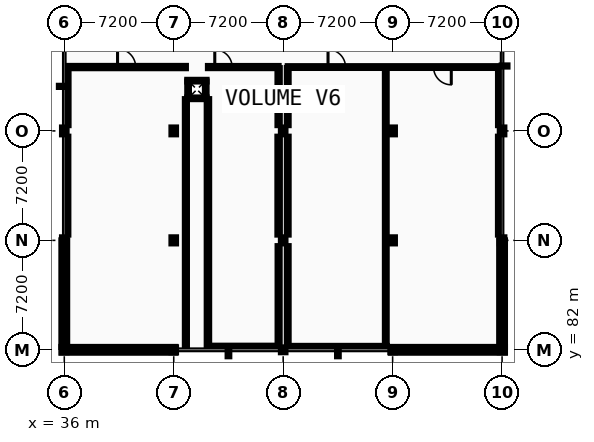
"""IFC4 building model, lengths in metres.
Left out: names, types, materials, properties, quantities, classifications, styles, units other than length and angle.
Written with IfcOpenShell. Run it as: python <this file> out.ifc"""

import sys

from ifc_helpers import new_model, si_unit, direction, frame, frame_2d, origin, origin_2d, place, context, subcontext, project, spatial, rectangle, i_section, extrude, element, fill, save


model = new_model("IFC4")
c1 = context("Model", 3, precision=1e-05, world=origin(), true_north=direction((0.0, 1.0)))
c2 = subcontext(c1, "Body", "Model", "MODEL_VIEW")
j1 = project(units=[si_unit("LENGTHUNIT", "METRE"), si_unit("PLANEANGLEUNIT", "RADIAN")], contexts=[c1])
p1 = place(None, origin())
s1 = spatial("IfcSite", under=j1, at=p1, CompositionType="ELEMENT")
p2 = place(p1, origin())
s2 = spatial("IfcBuilding", under=s1, at=p2, CompositionType="ELEMENT")
p3 = place(p2, frame((0.0, 0.0, 5.2)))
s3 = spatial("IfcBuildingStorey", under=s2, at=p3, CompositionType="ELEMENT", Elevation=5.2)
p4 = place(p3, frame((36.0, 82.0, 0.0), z_axis=(0.0, 0.0, 1.0), x_axis=(1.0, 0.0, 0.0)))
e1 = element("IfcColumn", 1, at=p4, inside=s3, PredefinedType="COLUMN", context=c2, shape_type="SweptSolid", body=[
    extrude(i_section(OverallWidth=0.3, OverallDepth=0.32, WebThickness=0.011, FlangeThickness=0.021, FilletRadius=0.027, at=origin_2d()), origin(), (0.0, 0.0, 1.0), 4.4),
])
p5 = place(p3, frame((36.0, 89.2, 0.0), z_axis=(0.0, 0.0, 1.0), x_axis=(1.0, 0.0, 0.0)))
e2 = element("IfcColumn", 2, at=p5, inside=s3, PredefinedType="COLUMN", context=c2, shape_type="SweptSolid", body=[
    extrude(i_section(OverallWidth=0.3, OverallDepth=0.4, WebThickness=0.013, FlangeThickness=0.024, FilletRadius=0.027, at=origin_2d()), origin(), (0.0, 0.0, 1.0), 4.4),
])
p6 = place(p3, frame((36.0, 96.4, 0.0), z_axis=(0.0, 0.0, 1.0), x_axis=(1.0, 0.0, 0.0)))
e3 = element("IfcColumn", 3, at=p6, inside=s3, PredefinedType="COLUMN", context=c2, shape_type="SweptSolid", body=[
    extrude(i_section(OverallWidth=0.3, OverallDepth=0.45, WebThickness=0.014, FlangeThickness=0.026, FilletRadius=0.027, at=origin_2d()), origin(), (0.0, 0.0, 1.0), 4.4),
])
p7 = place(p3, frame((43.2, 82.0, 0.0), z_axis=(0.0, 0.0, 1.0), x_axis=(1.0, 0.0, 0.0)))
e4 = element("IfcColumn", 4, at=p7, inside=s3, PredefinedType="COLUMN", context=c2, shape_type="SweptSolid", body=[
    extrude(i_section(OverallWidth=0.3, OverallDepth=0.32, WebThickness=0.011, FlangeThickness=0.021, FilletRadius=0.027, at=origin_2d()), origin(), (0.0, 0.0, 1.0), 4.4),
])
p8 = place(p3, frame((43.2, 89.2, 0.0), z_axis=(0.0, 0.0, 1.0), x_axis=(1.0, 0.0, 0.0)))
e5 = element("IfcColumn", 5, at=p8, inside=s3, PredefinedType="COLUMN", context=c2, shape_type="SweptSolid", body=[
    extrude(i_section(OverallWidth=0.3, OverallDepth=0.4, WebThickness=0.013, FlangeThickness=0.024, FilletRadius=0.027, at=origin_2d()), origin(), (0.0, 0.0, 1.0), 4.4),
])
p9 = place(p3, frame((43.2, 96.4, 0.0), z_axis=(0.0, 0.0, 1.0), x_axis=(1.0, 0.0, 0.0)))
e6 = element("IfcColumn", 6, at=p9, inside=s3, PredefinedType="COLUMN", context=c2, shape_type="SweptSolid", body=[
    extrude(i_section(OverallWidth=0.3, OverallDepth=0.45, WebThickness=0.014, FlangeThickness=0.026, FilletRadius=0.027, at=origin_2d()), origin(), (0.0, 0.0, 1.0), 4.4),
])
p10 = place(p3, frame((50.4, 82.0, 0.0), z_axis=(0.0, 0.0, 1.0), x_axis=(1.0, 0.0, 0.0)))
e7 = element("IfcColumn", 7, at=p10, inside=s3, PredefinedType="COLUMN", context=c2, shape_type="SweptSolid", body=[
    extrude(i_section(OverallWidth=0.3, OverallDepth=0.32, WebThickness=0.011, FlangeThickness=0.021, FilletRadius=0.027, at=origin_2d()), origin(), (0.0, 0.0, 1.0), 4.4),
])
p11 = place(p3, frame((50.4, 89.2, 0.0), z_axis=(0.0, 0.0, 1.0), x_axis=(1.0, 0.0, 0.0)))
e8 = element("IfcColumn", 8, at=p11, inside=s3, PredefinedType="COLUMN", context=c2, shape_type="SweptSolid", body=[
    extrude(i_section(OverallWidth=0.3, OverallDepth=0.4, WebThickness=0.013, FlangeThickness=0.024, FilletRadius=0.027, at=origin_2d()), origin(), (0.0, 0.0, 1.0), 4.4),
])
p12 = place(p3, frame((50.4, 96.4, 0.0), z_axis=(0.0, 0.0, 1.0), x_axis=(1.0, 0.0, 0.0)))
e9 = element("IfcColumn", 9, at=p12, inside=s3, PredefinedType="COLUMN", context=c2, shape_type="SweptSolid", body=[
    extrude(i_section(OverallWidth=0.3, OverallDepth=0.45, WebThickness=0.014, FlangeThickness=0.026, FilletRadius=0.027, at=origin_2d()), origin(), (0.0, 0.0, 1.0), 4.4),
])
p13 = place(p3, frame((57.6, 82.0, 0.0), z_axis=(0.0, 0.0, 1.0), x_axis=(1.0, 0.0, 0.0)))
e10 = element("IfcColumn", 10, at=p13, inside=s3, PredefinedType="COLUMN", context=c2, shape_type="SweptSolid", body=[
    extrude(i_section(OverallWidth=0.3, OverallDepth=0.32, WebThickness=0.011, FlangeThickness=0.021, FilletRadius=0.027, at=origin_2d()), origin(), (0.0, 0.0, 1.0), 4.4),
])
p14 = place(p3, frame((57.6, 89.2, 0.0), z_axis=(0.0, 0.0, 1.0), x_axis=(1.0, 0.0, 0.0)))
e11 = element("IfcColumn", 11, at=p14, inside=s3, PredefinedType="COLUMN", context=c2, shape_type="SweptSolid", body=[
    extrude(i_section(OverallWidth=0.3, OverallDepth=0.4, WebThickness=0.013, FlangeThickness=0.024, FilletRadius=0.027, at=origin_2d()), origin(), (0.0, 0.0, 1.0), 4.4),
])
p15 = place(p3, frame((57.6, 96.4, 0.0), z_axis=(0.0, 0.0, 1.0), x_axis=(1.0, 0.0, 0.0)))
e12 = element("IfcColumn", 12, at=p15, inside=s3, PredefinedType="COLUMN", context=c2, shape_type="SweptSolid", body=[
    extrude(i_section(OverallWidth=0.3, OverallDepth=0.45, WebThickness=0.014, FlangeThickness=0.026, FilletRadius=0.027, at=origin_2d()), origin(), (0.0, 0.0, 1.0), 4.4),
])
p16 = place(p3, frame((64.8, 82.0, 0.0), z_axis=(0.0, 0.0, 1.0), x_axis=(1.0, 0.0, 0.0)))
e13 = element("IfcColumn", 13, at=p16, inside=s3, PredefinedType="COLUMN", context=c2, shape_type="SweptSolid", body=[
    extrude(i_section(OverallWidth=0.3, OverallDepth=0.32, WebThickness=0.011, FlangeThickness=0.021, FilletRadius=0.027, at=origin_2d()), origin(), (0.0, 0.0, 1.0), 4.4),
])
p17 = place(p3, frame((64.8, 89.2, 0.0), z_axis=(0.0, 0.0, 1.0), x_axis=(1.0, 0.0, 0.0)))
e14 = element("IfcColumn", 14, at=p17, inside=s3, PredefinedType="COLUMN", context=c2, shape_type="SweptSolid", body=[
    extrude(i_section(OverallWidth=0.3, OverallDepth=0.4, WebThickness=0.013, FlangeThickness=0.024, FilletRadius=0.027, at=origin_2d()), origin(), (0.0, 0.0, 1.0), 4.4),
])
p18 = place(p3, frame((64.8, 96.4, 0.0), z_axis=(0.0, 0.0, 1.0), x_axis=(1.0, 0.0, 0.0)))
e15 = element("IfcColumn", 15, at=p18, inside=s3, PredefinedType="COLUMN", context=c2, shape_type="SweptSolid", body=[
    extrude(i_section(OverallWidth=0.3, OverallDepth=0.45, WebThickness=0.014, FlangeThickness=0.026, FilletRadius=0.027, at=origin_2d()), origin(), (0.0, 0.0, 1.0), 4.4),
])
p19 = place(p3, frame((35.81, 82.0, 0.0), z_axis=(0.0, 0.0, 1.0), x_axis=(1.0, 0.0, 0.0)))
e16 = element("IfcWall", 16, at=p19, inside=s3, PredefinedType="STANDARD", context=c2, shape_type="SweptSolid", body=[
    extrude(rectangle(XDim=7.5, YDim=0.38, at=frame_2d((3.75, 0.0))), origin(), (0.0, 0.0, 1.0), 3.88),
])
p20 = place(p19, frame((1.718, 0.0, 0.95)))
e17 = element("IfcOpeningElement", 17, at=p20, cuts=e16, PredefinedType="OPENING", context=c2, shape_type="SweptSolid", body=[
    extrude(rectangle(XDim=1.064, YDim=1.368, at=frame_2d((0.532, 0.684))), frame((0.0, 0.2, 0.0), z_axis=(0.0, -1.0, 0.0), x_axis=(1.0, 0.0, 0.0)), (0.0, 0.0, 1.0), 0.4),
])
p21 = place(p19, frame((4.718, 0.0, 0.95)))
e18 = element("IfcOpeningElement", 18, at=p21, cuts=e16, PredefinedType="OPENING", context=c2, shape_type="SweptSolid", body=[
    extrude(rectangle(XDim=1.064, YDim=1.368, at=frame_2d((0.532, 0.684))), frame((0.0, 0.2, 0.0), z_axis=(0.0, -1.0, 0.0), x_axis=(1.0, 0.0, 0.0)), (0.0, 0.0, 1.0), 0.4),
])
p22 = place(p3, frame((57.49, 82.0, 0.0), z_axis=(0.0, 0.0, 1.0), x_axis=(1.0, 0.0, 0.0)))
e19 = element("IfcWall", 19, at=p22, inside=s3, PredefinedType="STANDARD", context=c2, shape_type="SweptSolid", body=[
    extrude(rectangle(XDim=7.5, YDim=0.38, at=frame_2d((3.75, 0.0))), origin(), (0.0, 0.0, 1.0), 3.88),
])
p23 = place(p22, frame((1.701, 0.0, 0.95)))
e20 = element("IfcOpeningElement", 20, at=p23, cuts=e19, PredefinedType="OPENING", context=c2, shape_type="SweptSolid", body=[
    extrude(rectangle(XDim=1.098, YDim=1.368, at=frame_2d((0.549, 0.684))), frame((0.0, 0.2, 0.0), z_axis=(0.0, -1.0, 0.0), x_axis=(1.0, 0.0, 0.0)), (0.0, 0.0, 1.0), 0.4),
])
p24 = place(p22, frame((4.701, 0.0, 0.95)))
e21 = element("IfcOpeningElement", 21, at=p24, cuts=e19, PredefinedType="OPENING", context=c2, shape_type="SweptSolid", body=[
    extrude(rectangle(XDim=1.098, YDim=1.368, at=frame_2d((0.549, 0.684))), frame((0.0, 0.2, 0.0), z_axis=(0.0, -1.0, 0.0), x_axis=(1.0, 0.0, 0.0)), (0.0, 0.0, 1.0), 0.4),
])
p25 = place(p3, frame((36.0, 89.2, 0.0), z_axis=(0.0, 0.0, 1.0), x_axis=(0.0, -1.0, 0.0)))
e22 = element("IfcWall", 22, at=p25, inside=s3, PredefinedType="STANDARD", context=c2, shape_type="SweptSolid", body=[
    extrude(rectangle(XDim=7.01, YDim=0.38, at=frame_2d((3.505, 0.0))), origin(), (0.0, 0.0, 1.0), 3.81),
])
p26 = place(p25, frame((1.469, 0.0, 0.95)))
e23 = element("IfcOpeningElement", 23, at=p26, cuts=e22, PredefinedType="OPENING", context=c2, shape_type="SweptSolid", body=[
    extrude(rectangle(XDim=1.268, YDim=1.368, at=frame_2d((0.634, 0.684))), frame((0.0, 0.2, 0.0), z_axis=(0.0, -1.0, 0.0), x_axis=(1.0, 0.0, 0.0)), (0.0, 0.0, 1.0), 0.4),
])
p27 = place(p25, frame((4.273, 0.0, 0.95)))
e24 = element("IfcOpeningElement", 24, at=p27, cuts=e22, PredefinedType="OPENING", context=c2, shape_type="SweptSolid", body=[
    extrude(rectangle(XDim=1.268, YDim=1.368, at=frame_2d((0.634, 0.684))), frame((0.0, 0.2, 0.0), z_axis=(0.0, -1.0, 0.0), x_axis=(1.0, 0.0, 0.0)), (0.0, 0.0, 1.0), 0.4),
])
p28 = place(p3, frame((64.8, 82.19, 0.0), z_axis=(0.0, 0.0, 1.0), x_axis=(0.0, 1.0, 0.0)))
e25 = element("IfcWall", 25, at=p28, inside=s3, PredefinedType="STANDARD", context=c2, shape_type="SweptSolid", body=[
    extrude(rectangle(XDim=7.01, YDim=0.38, at=frame_2d((3.505, 0.0))), origin(), (0.0, 0.0, 1.0), 3.81),
])
p29 = place(p28, frame((1.639, 0.0, 0.95)))
e26 = element("IfcOpeningElement", 26, at=p29, cuts=e25, PredefinedType="OPENING", context=c2, shape_type="SweptSolid", body=[
    extrude(rectangle(XDim=0.928, YDim=1.404, at=frame_2d((0.464, 0.702))), frame((0.0, 0.2, 0.0), z_axis=(0.0, -1.0, 0.0), x_axis=(1.0, 0.0, 0.0)), (0.0, 0.0, 1.0), 0.4),
])
p30 = place(p28, frame((4.443, 0.0, 0.95)))
e27 = element("IfcOpeningElement", 27, at=p30, cuts=e25, PredefinedType="OPENING", context=c2, shape_type="SweptSolid", body=[
    extrude(rectangle(XDim=0.928, YDim=1.404, at=frame_2d((0.464, 0.702))), frame((0.0, 0.2, 0.0), z_axis=(0.0, -1.0, 0.0), x_axis=(1.0, 0.0, 0.0)), (0.0, 0.0, 1.0), 0.4),
])
for number, where, z_axis, x_axis in (
    (28, (44.09, 98.545, 0.0), (0.0, 0.0, 1.0), (1.0, 0.0, 0.0)),
    (29, (44.09, 99.705, 0.0), (0.0, 0.0, 1.0), (1.0, 0.0, 0.0)),
):
    element("IfcWall", number, at=place(p3, frame(where, z_axis=z_axis, x_axis=x_axis)), inside=s3, PredefinedType="PARTITIONING", context=c2, shape_type="SweptSolid", body=[
        extrude(rectangle(XDim=1.27, YDim=0.11, at=frame_2d((0.635, 0.0))), origin(), (0.0, 0.0, 1.0), 4.185),
    ])
for number, where, z_axis, x_axis in (
    (30, (44.145, 98.6, 0.0), (0.0, 0.0, 1.0), (0.0, 1.0, 0.0)),
    (31, (45.305, 98.6, 0.0), (0.0, 0.0, 1.0), (0.0, 1.0, 0.0)),
):
    element("IfcWall", number, at=place(p3, frame(where, z_axis=z_axis, x_axis=x_axis)), inside=s3, PredefinedType="PARTITIONING", context=c2, shape_type="SweptSolid", body=[
        extrude(rectangle(XDim=1.05, YDim=0.11, at=frame_2d((0.525, 0.0))), origin(), (0.0, 0.0, 1.0), 4.185),
    ])
p31 = place(p3, frame((45.45, 82.2, 0.0), z_axis=(0.0, 0.0, 1.0), x_axis=(1.0, 0.0, 0.0)))
e32 = element("IfcWall", 32, at=p31, inside=s3, PredefinedType="PARTITIONING", context=c2, shape_type="SweptSolid", body=[
    extrude(rectangle(XDim=4.57, YDim=0.142, at=frame_2d((2.285, 0.0))), origin(), (0.0, 0.0, 1.0), 3.88),
])
p32 = place(p3, frame((50.78, 82.2, 0.0), z_axis=(0.0, 0.0, 1.0), x_axis=(1.0, 0.0, 0.0)))
e33 = element("IfcWall", 33, at=p32, inside=s3, PredefinedType="PARTITIONING", context=c2, shape_type="SweptSolid", body=[
    extrude(rectangle(XDim=6.44, YDim=0.118, at=frame_2d((3.22, 0.0))), origin(), (0.0, 0.0, 1.0), 3.88),
])
p33 = place(p3, frame((36.2, 100.6, 0.0), z_axis=(0.0, 0.0, 1.0), x_axis=(1.0, 0.0, 0.0)))
e34 = element("IfcWall", 34, at=p33, inside=s3, PredefinedType="PARTITIONING", context=c2, shape_type="SweptSolid", body=[
    extrude(rectangle(XDim=7.8, YDim=0.15, at=frame_2d((3.9, 0.0))), origin(), (0.0, 0.0, 1.0), 4.185),
])
p34 = place(p33, frame((3.304, 0.0, 0.0)))
e35 = element("IfcOpeningElement", 35, at=p34, cuts=e34, PredefinedType="OPENING", context=c2, shape_type="SweptSolid", body=[
    extrude(rectangle(XDim=1.192, YDim=2.124, at=frame_2d((0.596, 1.062))), frame((0.0, 0.085, 0.0), z_axis=(0.0, -1.0, 0.0), x_axis=(1.0, 0.0, 0.0)), (0.0, 0.0, 1.0), 0.17),
])
p35 = place(p3, frame((45.45, 100.6, 0.0), z_axis=(0.0, 0.0, 1.0), x_axis=(1.0, 0.0, 0.0)))
e36 = element("IfcWall", 36, at=p35, inside=s3, PredefinedType="PARTITIONING", context=c2, shape_type="SweptSolid", body=[
    extrude(rectangle(XDim=4.65, YDim=0.142, at=frame_2d((2.325, 0.0))), origin(), (0.0, 0.0, 1.0), 4.185),
])
p36 = place(p35, frame((0.45, 0.0, 0.0)))
e37 = element("IfcOpeningElement", 37, at=p36, cuts=e36, PredefinedType="OPENING", context=c2, shape_type="SweptSolid", body=[
    extrude(rectangle(XDim=1.14, YDim=2.124, at=frame_2d((0.57, 1.062))), frame((0.0, 0.081, 0.0), z_axis=(0.0, -1.0, 0.0), x_axis=(1.0, 0.0, 0.0)), (0.0, 0.0, 1.0), 0.162),
])
p37 = place(p3, frame((50.7, 100.6, 0.0), z_axis=(0.0, 0.0, 1.0), x_axis=(1.0, 0.0, 0.0)))
e38 = element("IfcWall", 38, at=p37, inside=s3, PredefinedType="PARTITIONING", context=c2, shape_type="SweptSolid", body=[
    extrude(rectangle(XDim=13.9, YDim=0.118, at=frame_2d((6.95, 0.0))), origin(), (0.0, 0.0, 1.0), 4.185),
])
p38 = place(p37, frame((2.65, 0.0, 0.0)))
e39 = element("IfcOpeningElement", 39, at=p38, cuts=e38, PredefinedType="OPENING", context=c2, shape_type="SweptSolid", body=[
    extrude(rectangle(XDim=1.15, YDim=2.15, at=frame_2d((0.575, 1.075))), frame((0.0, 0.069, 0.0), z_axis=(0.0, -1.0, 0.0), x_axis=(1.0, 0.0, 0.0)), (0.0, 0.0, 1.0), 0.138),
])
p39 = place(p37, frame((9.592, 0.0, 0.0)))
e40 = element("IfcOpeningElement", 40, at=p39, cuts=e38, PredefinedType="OPENING", context=c2, shape_type="SweptSolid", body=[
    extrude(rectangle(XDim=1.166, YDim=2.124, at=frame_2d((0.583, 1.062))), frame((0.0, 0.069, 0.0), z_axis=(0.0, -1.0, 0.0), x_axis=(1.0, 0.0, 0.0)), (0.0, 0.0, 1.0), 0.138),
])
p40 = place(p3, frame((36.2, 89.58, 0.0), z_axis=(0.0, 0.0, 1.0), x_axis=(0.0, 1.0, 0.0)))
e41 = element("IfcWall", 41, at=p40, inside=s3, PredefinedType="PARTITIONING", context=c2, shape_type="SweptSolid", body=[
    extrude(rectangle(XDim=6.44, YDim=0.135, at=frame_2d((3.22, 0.0))), origin(), (0.0, 0.0, 1.0), 3.81),
])
p41 = place(p3, frame((36.2, 96.78, 0.0), z_axis=(0.0, 0.0, 1.0), x_axis=(0.0, 1.0, 0.0)))
e42 = element("IfcWall", 42, at=p41, inside=s3, PredefinedType="PARTITIONING", context=c2, shape_type="SweptSolid", body=[
    extrude(rectangle(XDim=3.745, YDim=0.16, at=frame_2d((1.873, 0.0))), origin(), (0.0, 0.0, 1.0), 3.81),
])
p42 = place(p3, frame((44.0, 82.2, 0.0), z_axis=(0.0, 0.0, 1.0), x_axis=(0.0, 1.0, 0.0)))
e43 = element("IfcWall", 43, at=p42, inside=s3, PredefinedType="PARTITIONING", context=c2, shape_type="SweptSolid", body=[
    extrude(rectangle(XDim=16.29, YDim=0.135, at=frame_2d((8.145, 0.0))), origin(), (0.0, 0.0, 1.0), 4.185),
])
p43 = place(p3, frame((45.45, 82.271, 0.0), z_axis=(0.0, 0.0, 1.0), x_axis=(0.0, 1.0, 0.0)))
e44 = element("IfcWall", 44, at=p43, inside=s3, PredefinedType="PARTITIONING", context=c2, shape_type="SweptSolid", body=[
    extrude(rectangle(XDim=16.219, YDim=0.16, at=frame_2d((8.109, 0.0))), origin(), (0.0, 0.0, 1.0), 3.9),
])
p44 = place(p3, frame((50.1, 82.38, 0.0), z_axis=(0.0, 0.0, 1.0), x_axis=(0.0, 1.0, 0.0)))
e45 = element("IfcWall", 45, at=p44, inside=s3, PredefinedType="PARTITIONING", context=c2, shape_type="SweptSolid", body=[
    extrude(rectangle(XDim=6.44, YDim=0.135, at=frame_2d((3.22, 0.0))), origin(), (0.0, 0.0, 1.0), 4.185),
])
p45 = place(p3, frame((50.1, 89.58, 0.0), z_axis=(0.0, 0.0, 1.0), x_axis=(0.0, 1.0, 0.0)))
e46 = element("IfcWall", 46, at=p45, inside=s3, PredefinedType="PARTITIONING", context=c2, shape_type="SweptSolid", body=[
    extrude(rectangle(XDim=6.44, YDim=0.16, at=frame_2d((3.22, 0.0))), origin(), (0.0, 0.0, 1.0), 3.88),
])
p46 = place(p3, frame((50.1, 96.78, 0.0), z_axis=(0.0, 0.0, 1.0), x_axis=(0.0, 1.0, 0.0)))
e47 = element("IfcWall", 47, at=p46, inside=s3, PredefinedType="PARTITIONING", context=c2, shape_type="SweptSolid", body=[
    extrude(rectangle(XDim=3.749, YDim=0.15, at=frame_2d((1.875, 0.0))), origin(), (0.0, 0.0, 1.0), 3.88),
])
p47 = place(p3, frame((50.7, 82.38, 0.0), z_axis=(0.0, 0.0, 1.0), x_axis=(0.0, 1.0, 0.0)))
e48 = element("IfcWall", 48, at=p47, inside=s3, PredefinedType="PARTITIONING", context=c2, shape_type="SweptSolid", body=[
    extrude(rectangle(XDim=6.44, YDim=0.118, at=frame_2d((3.22, 0.0))), origin(), (0.0, 0.0, 1.0), 4.185),
])
p48 = place(p3, frame((50.7, 89.58, 0.0), z_axis=(0.0, 0.0, 1.0), x_axis=(0.0, 1.0, 0.0)))
e49 = element("IfcWall", 49, at=p48, inside=s3, PredefinedType="PARTITIONING", context=c2, shape_type="SweptSolid", body=[
    extrude(rectangle(XDim=6.44, YDim=0.118, at=frame_2d((3.22, 0.0))), origin(), (0.0, 0.0, 1.0), 4.185),
])
p49 = place(p3, frame((50.7, 96.78, 0.0), z_axis=(0.0, 0.0, 1.0), x_axis=(0.0, 1.0, 0.0)))
e50 = element("IfcWall", 50, at=p49, inside=s3, PredefinedType="PARTITIONING", context=c2, shape_type="SweptSolid", body=[
    extrude(rectangle(XDim=3.761, YDim=0.118, at=frame_2d((1.88, 0.0))), origin(), (0.0, 0.0, 1.0), 4.185),
])
p50 = place(p3, frame((57.15, 82.259, 0.0), z_axis=(0.0, 0.0, 1.0), x_axis=(0.0, 1.0, 0.0)))
e51 = element("IfcWall", 51, at=p50, inside=s3, PredefinedType="PARTITIONING", context=c2, shape_type="SweptSolid", body=[
    extrude(rectangle(XDim=18.282, YDim=0.118, at=frame_2d((9.141, 0.0))), origin(), (0.0, 0.0, 1.0), 4.185),
])
p51 = place(p3, frame((64.6, 89.58, 0.0), z_axis=(0.0, 0.0, 1.0), x_axis=(0.0, 1.0, 0.0)))
e52 = element("IfcWall", 52, at=p51, inside=s3, PredefinedType="PARTITIONING", context=c2, shape_type="SweptSolid", body=[
    extrude(rectangle(XDim=6.44, YDim=0.142, at=frame_2d((3.22, 0.0))), origin(), (0.0, 0.0, 1.0), 3.81),
])
p52 = place(p3, frame((64.6, 96.78, 0.0), z_axis=(0.0, 0.0, 1.0), x_axis=(0.0, 1.0, 0.0)))
e53 = element("IfcWall", 53, at=p52, inside=s3, PredefinedType="PARTITIONING", context=c2, shape_type="SweptSolid", body=[
    extrude(rectangle(XDim=3.761, YDim=0.135, at=frame_2d((1.88, 0.0))), origin(), (0.0, 0.0, 1.0), 3.81),
])
p53 = place(p20, origin())
e54 = element("IfcWindow", 54, at=p53, inside=s3, PartitioningType="SINGLE_PANEL", PredefinedType="WINDOW", context=c2, shape_type="SweptSolid", body=[
    extrude(rectangle(XDim=1.064, YDim=1.368, at=frame_2d((0.532, 0.684))), frame((0.0, 0.03, 0.0), z_axis=(0.0, -1.0, 0.0), x_axis=(1.0, 0.0, 0.0)), (0.0, 0.0, 1.0), 0.06),
])
fill(e17, e54)
p54 = place(p21, origin())
e55 = element("IfcWindow", 55, at=p54, inside=s3, PartitioningType="SINGLE_PANEL", PredefinedType="WINDOW", context=c2, shape_type="SweptSolid", body=[
    extrude(rectangle(XDim=1.064, YDim=1.368, at=frame_2d((0.532, 0.684))), frame((0.0, 0.03, 0.0), z_axis=(0.0, -1.0, 0.0), x_axis=(1.0, 0.0, 0.0)), (0.0, 0.0, 1.0), 0.06),
])
fill(e18, e55)
p55 = place(p23, origin())
e56 = element("IfcWindow", 56, at=p55, inside=s3, PartitioningType="SINGLE_PANEL", PredefinedType="WINDOW", context=c2, shape_type="SweptSolid", body=[
    extrude(rectangle(XDim=1.098, YDim=1.368, at=frame_2d((0.549, 0.684))), frame((0.0, 0.03, 0.0), z_axis=(0.0, -1.0, 0.0), x_axis=(1.0, 0.0, 0.0)), (0.0, 0.0, 1.0), 0.06),
])
fill(e20, e56)
p56 = place(p24, origin())
e57 = element("IfcWindow", 57, at=p56, inside=s3, PartitioningType="SINGLE_PANEL", PredefinedType="WINDOW", context=c2, shape_type="SweptSolid", body=[
    extrude(rectangle(XDim=1.098, YDim=1.368, at=frame_2d((0.549, 0.684))), frame((0.0, 0.03, 0.0), z_axis=(0.0, -1.0, 0.0), x_axis=(1.0, 0.0, 0.0)), (0.0, 0.0, 1.0), 0.06),
])
fill(e21, e57)
p57 = place(p26, origin())
e58 = element("IfcWindow", 58, at=p57, inside=s3, PartitioningType="SINGLE_PANEL", PredefinedType="WINDOW", context=c2, shape_type="SweptSolid", body=[
    extrude(rectangle(XDim=1.268, YDim=1.368, at=frame_2d((0.634, 0.684))), frame((0.0, 0.03, 0.0), z_axis=(0.0, -1.0, 0.0), x_axis=(1.0, 0.0, 0.0)), (0.0, 0.0, 1.0), 0.06),
])
fill(e23, e58)
p58 = place(p27, origin())
e59 = element("IfcWindow", 59, at=p58, inside=s3, PartitioningType="SINGLE_PANEL", PredefinedType="WINDOW", context=c2, shape_type="SweptSolid", body=[
    extrude(rectangle(XDim=1.268, YDim=1.368, at=frame_2d((0.634, 0.684))), frame((0.0, 0.03, 0.0), z_axis=(0.0, -1.0, 0.0), x_axis=(1.0, 0.0, 0.0)), (0.0, 0.0, 1.0), 0.06),
])
fill(e24, e59)
p59 = place(p29, origin())
e60 = element("IfcWindow", 60, at=p59, inside=s3, PartitioningType="SINGLE_PANEL", PredefinedType="WINDOW", context=c2, shape_type="SweptSolid", body=[
    extrude(rectangle(XDim=0.928, YDim=1.404, at=frame_2d((0.464, 0.702))), frame((0.0, 0.03, 0.0), z_axis=(0.0, -1.0, 0.0), x_axis=(1.0, 0.0, 0.0)), (0.0, 0.0, 1.0), 0.06),
])
fill(e26, e60)
p60 = place(p30, origin())
e61 = element("IfcWindow", 61, at=p60, inside=s3, PartitioningType="SINGLE_PANEL", PredefinedType="WINDOW", context=c2, shape_type="SweptSolid", body=[
    extrude(rectangle(XDim=0.928, YDim=1.404, at=frame_2d((0.464, 0.702))), frame((0.0, 0.03, 0.0), z_axis=(0.0, -1.0, 0.0), x_axis=(1.0, 0.0, 0.0)), (0.0, 0.0, 1.0), 0.06),
])
fill(e27, e61)
p61 = place(p36, origin())
e62 = element("IfcDoor", 62, at=p61, inside=s3, OperationType="SINGLE_SWING_LEFT", PredefinedType="DOOR", context=c2, shape_type="SweptSolid", body=[
    extrude(rectangle(XDim=1.14, YDim=2.124, at=frame_2d((0.57, 1.062))), frame((0.0, 0.025, 0.0), z_axis=(0.0, -1.0, 0.0), x_axis=(1.0, 0.0, 0.0)), (0.0, 0.0, 1.0), 0.05),
])
fill(e37, e62)
p62 = place(p38, origin())
e63 = element("IfcDoor", 63, at=p62, inside=s3, OperationType="SINGLE_SWING_LEFT", PredefinedType="DOOR", context=c2, shape_type="SweptSolid", body=[
    extrude(rectangle(XDim=1.15, YDim=2.15, at=frame_2d((0.575, 1.075))), frame((0.0, 0.025, 0.0), z_axis=(0.0, -1.0, 0.0), x_axis=(1.0, 0.0, 0.0)), (0.0, 0.0, 1.0), 0.05),
])
fill(e39, e63)
p63 = place(p39, origin())
e64 = element("IfcDoor", 64, at=p63, inside=s3, OperationType="SINGLE_SWING_RIGHT", PredefinedType="DOOR", context=c2, shape_type="SweptSolid", body=[
    extrude(rectangle(XDim=1.166, YDim=2.124, at=frame_2d((0.583, 1.062))), frame((0.0, 0.025, 0.0), z_axis=(0.0, -1.0, 0.0), x_axis=(1.0, 0.0, 0.0)), (0.0, 0.0, 1.0), 0.05),
])
fill(e40, e64)
p64 = place(p34, origin())
e65 = element("IfcDoor", 65, at=p64, inside=s3, OperationType="SINGLE_SWING_LEFT", PredefinedType="DOOR", context=c2, shape_type="SweptSolid", body=[
    extrude(rectangle(XDim=1.192, YDim=2.124, at=frame_2d((0.596, 1.062))), frame((0.0, 0.025, 0.0), z_axis=(0.0, -1.0, 0.0), x_axis=(1.0, 0.0, 0.0)), (0.0, 0.0, 1.0), 0.05),
])
fill(e35, e65)
save(model, sys.argv[1])
